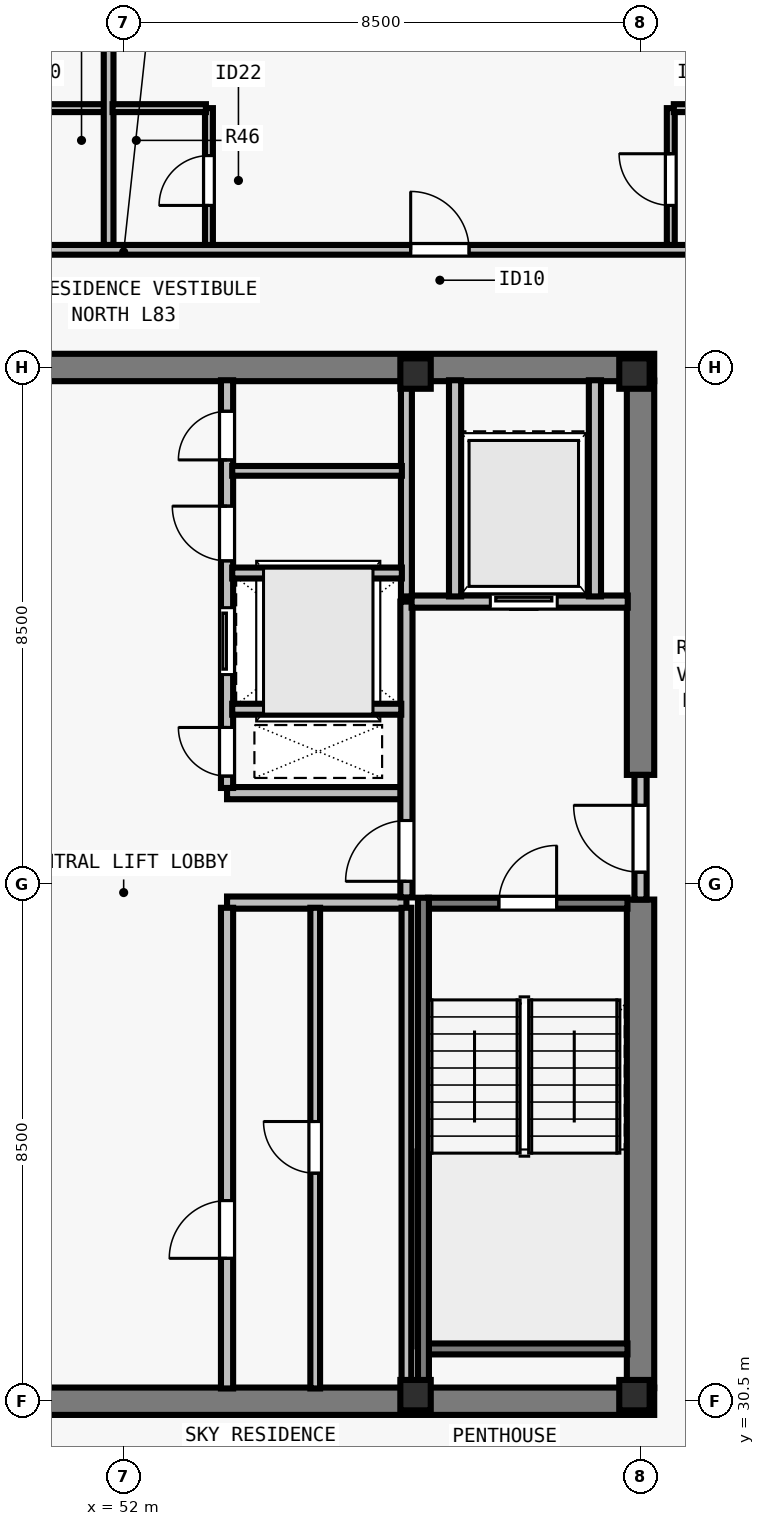
"""IFC4 building model, lengths in metres.
Left out: names, types, materials, properties, quantities, classifications, styles, units other than length and angle.
Written with IfcOpenShell. Run it as: python <this file> out.ifc"""

import sys

from ifc_helpers import new_model, si_unit, direction, frame, frame_2d, origin, origin_2d, place, context, subcontext, project, spatial, rectangle, i_section, extrude, element, fill, save


model = new_model("IFC4")
c1 = context("Model", 3, precision=1e-05, world=origin(), true_north=direction((0.0, 1.0)))
c2 = subcontext(c1, "Body", "Model", "MODEL_VIEW")
j1 = project(units=[si_unit("LENGTHUNIT", "METRE"), si_unit("PLANEANGLEUNIT", "RADIAN")], contexts=[c1])
p1 = place(None, origin())
s1 = spatial("IfcSite", under=j1, at=p1, CompositionType="ELEMENT")
p2 = place(p1, origin())
s2 = spatial("IfcBuilding", under=s1, at=p2, CompositionType="ELEMENT")
p3 = place(p2, frame((0.0, 0.0, 301.5)))
s3 = spatial("IfcBuildingStorey", under=s2, at=p3, CompositionType="ELEMENT", Elevation=301.5)
for number, where, z_axis, x_axis in (
    (1, (56.8, 30.6, 0.0), (0.0, 0.0, 1.0), (1.0, 0.0, 0.0)),
    (2, (60.4, 30.6, 0.0), (0.0, 0.0, 1.0), (1.0, 0.0, 0.0)),
    (3, (56.8, 47.4, 0.0), (0.0, 0.0, 1.0), (1.0, 0.0, 0.0)),
    (4, (60.4, 47.4, 0.0), (0.0, 0.0, 1.0), (1.0, 0.0, 0.0)),
):
    element("IfcColumn", number, at=place(p3, frame(where, z_axis=z_axis, x_axis=x_axis)), inside=s3, PredefinedType="COLUMN", context=c2, shape_type="SweptSolid", body=[
        extrude(i_section(OverallWidth=0.5, OverallDepth=0.5, WebThickness=0.028, FlangeThickness=0.045, at=origin_2d()), origin(), (0.0, 0.0, 1.0), 3.5),
    ])
for number, where, z_axis, x_axis in (
    (5, (43.275, 30.5, 0.0), (0.0, 0.0, 1.0), (1.0, 0.0, 0.0)),
    (6, (43.275, 47.5, 0.0), (0.0, 0.0, 1.0), (1.0, 0.0, 0.0)),
):
    element("IfcWall", number, at=place(p3, frame(where, z_axis=z_axis, x_axis=x_axis)), inside=s3, PredefinedType="SHEAR", context=c2, shape_type="SweptSolid", body=[
        extrude(rectangle(XDim=17.45, YDim=0.45, at=frame_2d((8.725, 0.0))), origin(), (0.0, 0.0, 1.0), 3.29),
    ])
p4 = place(p3, frame((60.5, 30.715, 0.0), z_axis=(0.0, 0.0, 1.0), x_axis=(0.0, 1.0, 0.0)))
e7 = element("IfcWall", 7, at=p4, inside=s3, PredefinedType="SHEAR", context=c2, shape_type="SweptSolid", body=[
    extrude(rectangle(XDim=8.035, YDim=0.45, at=frame_2d((4.018, 0.0))), origin(), (0.0, 0.0, 1.0), 3.29),
])
p5 = place(p3, frame((60.5, 40.8, 0.0), z_axis=(0.0, 0.0, 1.0), x_axis=(0.0, 1.0, 0.0)))
e8 = element("IfcWall", 8, at=p5, inside=s3, PredefinedType="SHEAR", context=c2, shape_type="SweptSolid", body=[
    extrude(rectangle(XDim=6.485, YDim=0.45, at=frame_2d((3.242, 0.0))), origin(), (0.0, 0.0, 1.0), 3.29),
])
for number, where, z_axis, x_axis in (
    (9, (53.7, 38.7, 0.0), (0.0, 0.0, 1.0), (1.0, 0.0, 0.0)),
    (10, (53.7, 40.5, 0.0), (0.0, 0.0, 1.0), (1.0, 0.0, 0.0)),
):
    element("IfcWall", number, at=place(p3, frame(where, z_axis=z_axis, x_axis=x_axis)), inside=s3, PredefinedType="SOLIDWALL", context=c2, shape_type="SweptSolid", body=[
        extrude(rectangle(XDim=2.95, YDim=0.2, at=frame_2d((1.475, 0.0))), origin(), (0.0, 0.0, 1.0), 3.29),
    ])
p6 = place(p3, frame((53.7, 30.71, 0.0), z_axis=(0.0, 0.0, 1.0), x_axis=(0.0, 1.0, 0.0)))
e11 = element("IfcWall", 11, at=p6, inside=s3, PredefinedType="SOLIDWALL", context=c2, shape_type="SweptSolid", body=[
    extrude(rectangle(XDim=7.905, YDim=0.2, at=frame_2d((3.953, 0.0))), origin(), (0.0, 0.0, 1.0), 3.29),
])
p7 = place(p6, frame((2.14, 0.0, 0.0)))
e12 = element("IfcOpeningElement", 12, at=p7, cuts=e11, PredefinedType="OPENING", context=c2, shape_type="SweptSolid", body=[
    extrude(rectangle(XDim=0.95, YDim=2.12, at=frame_2d((0.475, 1.06))), frame((0.0, 0.11, 0.0), z_axis=(0.0, -1.0, 0.0), x_axis=(1.0, 0.0, 0.0)), (0.0, 0.0, 1.0), 0.22),
])
p8 = place(p3, frame((53.7, 40.585, 0.0), z_axis=(0.0, 0.0, 1.0), x_axis=(0.0, 1.0, 0.0)))
e13 = element("IfcWall", 13, at=p8, inside=s3, PredefinedType="SOLIDWALL", context=c2, shape_type="SweptSolid", body=[
    extrude(rectangle(XDim=6.705, YDim=0.2, at=frame_2d((3.353, 0.0))), origin(), (0.0, 0.0, 1.0), 3.29),
])
p9 = place(p8, frame((0.195, 0.0, 0.0)))
e14 = element("IfcOpeningElement", 14, at=p9, cuts=e13, PredefinedType="OPENING", context=c2, shape_type="SweptSolid", body=[
    extrude(rectangle(XDim=0.8, YDim=2.08, at=frame_2d((0.4, 1.04))), frame((0.0, 0.11, 0.0), z_axis=(0.0, -1.0, 0.0), x_axis=(1.0, 0.0, 0.0)), (0.0, 0.0, 1.0), 0.22),
])
p10 = place(p8, frame((1.865, 0.0, 0.0)))
e15 = element("IfcOpeningElement", 15, at=p10, cuts=e13, PredefinedType="OPENING", context=c2, shape_type="SweptSolid", body=[
    extrude(rectangle(XDim=1.1, YDim=2.2, at=frame_2d((0.55, 1.1))), frame((0.0, 0.11, 0.0), z_axis=(0.0, -1.0, 0.0), x_axis=(1.0, 0.0, 0.0)), (0.0, 0.0, 1.0), 0.22),
])
p11 = place(p8, frame((3.735, 0.0, 0.0)))
e16 = element("IfcOpeningElement", 16, at=p11, cuts=e13, PredefinedType="OPENING", context=c2, shape_type="SweptSolid", body=[
    extrude(rectangle(XDim=0.9, YDim=2.12, at=frame_2d((0.45, 1.06))), frame((0.0, 0.11, 0.0), z_axis=(0.0, -1.0, 0.0), x_axis=(1.0, 0.0, 0.0)), (0.0, 0.0, 1.0), 0.22),
])
p12 = place(p8, frame((5.395, 0.0, 0.0)))
e17 = element("IfcOpeningElement", 17, at=p12, cuts=e13, PredefinedType="OPENING", context=c2, shape_type="SweptSolid", body=[
    extrude(rectangle(XDim=0.8, YDim=2.1, at=frame_2d((0.4, 1.05))), frame((0.0, 0.11, 0.0), z_axis=(0.0, -1.0, 0.0), x_axis=(1.0, 0.0, 0.0)), (0.0, 0.0, 1.0), 0.22),
])
p13 = place(p3, frame((60.5, 38.75, 0.0), z_axis=(0.0, 0.0, 1.0), x_axis=(0.0, 1.0, 0.0)))
e18 = element("IfcWall", 18, at=p13, inside=s3, PredefinedType="SOLIDWALL", context=c2, shape_type="SweptSolid", body=[
    extrude(rectangle(XDim=2.05, YDim=0.2, at=frame_2d((1.025, 0.0))), origin(), (0.0, 0.0, 1.0), 3.29),
])
p14 = place(p13, frame((0.45, 0.0, 0.0)))
e19 = element("IfcOpeningElement", 19, at=p14, cuts=e18, PredefinedType="OPENING", context=c2, shape_type="SweptSolid", body=[
    extrude(rectangle(XDim=1.1, YDim=2.15, at=frame_2d((0.55, 1.075))), frame((0.0, 0.11, 0.0), z_axis=(0.0, -1.0, 0.0), x_axis=(1.0, 0.0, 0.0)), (0.0, 0.0, 1.0), 0.22),
])
p15 = place(p3, frame((56.65, 38.785, 0.0), z_axis=(0.0, 0.0, 1.0), x_axis=(0.0, 1.0, 0.0)))
e20 = element("IfcWall", 20, at=p15, inside=s3, PredefinedType="SOLIDWALL", context=c2, shape_type="SweptSolid", body=[
    extrude(rectangle(XDim=4.865, YDim=0.2, at=frame_2d((2.433, 0.0))), origin(), (0.0, 0.0, 1.0), 3.29),
])
p16 = place(p15, frame((0.265, 0.0, 0.0)))
e21 = element("IfcOpeningElement", 21, at=p16, cuts=e20, PredefinedType="OPENING", context=c2, shape_type="SweptSolid", body=[
    extrude(rectangle(XDim=1.0, YDim=2.15, at=frame_2d((0.5, 1.075))), frame((0.0, 0.11, 0.0), z_axis=(0.0, -1.0, 0.0), x_axis=(1.0, 0.0, 0.0)), (0.0, 0.0, 1.0), 0.22),
])
p17 = place(p3, frame((56.735, 43.65, 0.0), z_axis=(0.0, 0.0, 1.0), x_axis=(1.0, 0.0, 0.0)))
e22 = element("IfcWall", 22, at=p17, inside=s3, PredefinedType="SOLIDWALL", context=c2, shape_type="SweptSolid", body=[
    extrude(rectangle(XDim=3.555, YDim=0.2, at=frame_2d((1.777, 0.0))), origin(), (0.0, 0.0, 1.0), 3.29),
])
p18 = place(p17, frame((1.295, 0.0, 0.0)))
e23 = element("IfcOpeningElement", 23, at=p18, cuts=e22, PredefinedType="OPENING", context=c2, shape_type="SweptSolid", body=[
    extrude(rectangle(XDim=1.1, YDim=2.2, at=frame_2d((0.55, 1.1))), frame((0.0, 0.11, 0.0), z_axis=(0.0, -1.0, 0.0), x_axis=(1.0, 0.0, 0.0)), (0.0, 0.0, 1.0), 0.22),
])
for number, where, z_axis, x_axis in (
    (24, (57.45, 43.735, 0.0), (0.0, 0.0, 1.0), (0.0, 1.0, 0.0)),
    (25, (59.75, 43.735, 0.0), (0.0, 0.0, 1.0), (0.0, 1.0, 0.0)),
):
    element("IfcWall", number, at=place(p3, frame(where, z_axis=z_axis, x_axis=x_axis)), inside=s3, PredefinedType="SOLIDWALL", context=c2, shape_type="SweptSolid", body=[
        extrude(rectangle(XDim=3.555, YDim=0.2, at=frame_2d((1.777, 0.0))), origin(), (0.0, 0.0, 1.0), 3.29),
    ])
p19 = place(p3, frame((56.65, 30.71, 0.0), z_axis=(0.0, 0.0, 1.0), x_axis=(0.0, 1.0, 0.0)))
e26 = element("IfcWall", 26, at=p19, inside=s3, PredefinedType="PARTITIONING", context=c2, shape_type="SweptSolid", body=[
    extrude(rectangle(XDim=7.905, YDim=0.16, at=frame_2d((3.953, 0.0))), origin(), (0.0, 0.0, 1.0), 3.29),
])
p20 = place(p3, frame((55.15, 30.71, 0.0), z_axis=(0.0, 0.0, 1.0), x_axis=(0.0, 1.0, 0.0)))
e27 = element("IfcWall", 27, at=p20, inside=s3, PredefinedType="PARTITIONING", context=c2, shape_type="SweptSolid", body=[
    extrude(rectangle(XDim=7.905, YDim=0.16, at=frame_2d((3.953, 0.0))), origin(), (0.0, 0.0, 1.0), 3.29),
])
p21 = place(p20, frame((3.54, 0.0, 0.0)))
e28 = element("IfcOpeningElement", 28, at=p21, cuts=e27, PredefinedType="OPENING", context=c2, shape_type="SweptSolid", body=[
    extrude(rectangle(XDim=0.85, YDim=2.12, at=frame_2d((0.425, 1.06))), frame((0.0, 0.09, 0.0), z_axis=(0.0, -1.0, 0.0), x_axis=(1.0, 0.0, 0.0)), (0.0, 0.0, 1.0), 0.18),
])
p22 = place(p3, frame((56.65, 43.735, 0.0), z_axis=(0.0, 0.0, 1.0), x_axis=(0.0, 1.0, 0.0)))
e29 = element("IfcWall", 29, at=p22, inside=s3, PredefinedType="SOLIDWALL", context=c2, shape_type="SweptSolid", body=[
    extrude(rectangle(XDim=3.555, YDim=0.18, at=frame_2d((1.777, 0.0))), origin(), (0.0, 0.0, 1.0), 3.29),
])
p23 = place(p3, frame((53.785, 41.88, 0.0), z_axis=(0.0, 0.0, 1.0), x_axis=(1.0, 0.0, 0.0)))
e30 = element("IfcWall", 30, at=p23, inside=s3, PredefinedType="SOLIDWALL", context=c2, shape_type="SweptSolid", body=[
    extrude(rectangle(XDim=2.78, YDim=0.18, at=frame_2d((1.39, 0.0))), origin(), (0.0, 0.0, 1.0), 3.29),
])
p24 = place(p3, frame((53.785, 44.12, 0.0), z_axis=(0.0, 0.0, 1.0), x_axis=(1.0, 0.0, 0.0)))
e31 = element("IfcWall", 31, at=p24, inside=s3, PredefinedType="SOLIDWALL", context=c2, shape_type="SweptSolid", body=[
    extrude(rectangle(XDim=2.79, YDim=0.18, at=frame_2d((1.395, 0.0))), origin(), (0.0, 0.0, 1.0), 3.29),
])
p25 = place(p3, frame((53.785, 45.8, 0.0), z_axis=(0.0, 0.0, 1.0), x_axis=(1.0, 0.0, 0.0)))
e32 = element("IfcWall", 32, at=p25, inside=s3, PredefinedType="PARTITIONING", context=c2, shape_type="SweptSolid", body=[
    extrude(rectangle(XDim=2.79, YDim=0.16, at=frame_2d((1.395, 0.0))), origin(), (0.0, 0.0, 1.0), 3.29),
])
p26 = place(p3, frame((31.285, 49.435, 0.0), z_axis=(0.0, 0.0, 1.0), x_axis=(1.0, 0.0, 0.0)))
e33 = element("IfcWall", 33, at=p26, inside=s3, PredefinedType="PARTITIONING", context=c2, shape_type="SweptSolid", body=[
    extrude(rectangle(XDim=41.43, YDim=0.16, at=frame_2d((20.715, 0.0))), origin(), (0.0, 0.0, 1.0), 3.009),
])
p27 = place(p26, frame((4.979, 0.0, 0.0)))
e34 = element("IfcOpeningElement", 34, at=p27, cuts=e33, PredefinedType="OPENING", context=c2, shape_type="SweptSolid", body=[
    extrude(rectangle(XDim=0.96, YDim=2.18, at=frame_2d((0.48, 1.09))), frame((0.0, 0.09, 0.0), z_axis=(0.0, -1.0, 0.0), x_axis=(1.0, 0.0, 0.0)), (0.0, 0.0, 1.0), 0.18),
])
p28 = place(p26, frame((15.145, 0.0, 0.0)))
e35 = element("IfcOpeningElement", 35, at=p28, cuts=e33, PredefinedType="OPENING", context=c2, shape_type="SweptSolid", body=[
    extrude(rectangle(XDim=0.96, YDim=2.18, at=frame_2d((0.48, 1.09))), frame((0.0, 0.09, 0.0), z_axis=(0.0, -1.0, 0.0), x_axis=(1.0, 0.0, 0.0)), (0.0, 0.0, 1.0), 0.18),
])
p29 = place(p26, frame((25.435, 0.0, 0.0)))
e36 = element("IfcOpeningElement", 36, at=p29, cuts=e33, PredefinedType="OPENING", context=c2, shape_type="SweptSolid", body=[
    extrude(rectangle(XDim=0.96, YDim=2.18, at=frame_2d((0.48, 1.09))), frame((0.0, 0.09, 0.0), z_axis=(0.0, -1.0, 0.0), x_axis=(1.0, 0.0, 0.0)), (0.0, 0.0, 1.0), 0.18),
])
p30 = place(p26, frame((35.849, 0.0, 0.0)))
e37 = element("IfcOpeningElement", 37, at=p30, cuts=e33, PredefinedType="OPENING", context=c2, shape_type="SweptSolid", body=[
    extrude(rectangle(XDim=0.96, YDim=2.18, at=frame_2d((0.48, 1.09))), frame((0.0, 0.09, 0.0), z_axis=(0.0, -1.0, 0.0), x_axis=(1.0, 0.0, 0.0)), (0.0, 0.0, 1.0), 0.18),
])
p31 = place(p3, frame((50.153, 51.765, 0.0), z_axis=(0.0, 0.0, 1.0), x_axis=(1.0, 0.0, 0.0)))
e38 = element("IfcWall", 38, at=p31, inside=s3, PredefinedType="PLUMBINGWALL", context=c2, shape_type="SweptSolid", body=[
    extrude(rectangle(XDim=1.6, YDim=0.13, at=frame_2d((0.8, 0.0))), origin(), (0.0, 0.0, 1.0), 3.29),
])
p32 = place(p3, frame((51.752, 49.515, 0.0), z_axis=(0.0, 0.0, 1.0), x_axis=(0.0, 1.0, 0.0)))
e39 = element("IfcWall", 39, at=p32, inside=s3, PredefinedType="PARTITIONING", context=c2, shape_type="SweptSolid", body=[
    extrude(rectangle(XDim=10.185, YDim=0.16, at=frame_2d((5.093, 0.0))), origin(), (0.0, 0.0, 1.0), 3.009),
])
p33 = place(p3, frame((53.403, 49.515, 0.0), z_axis=(0.0, 0.0, 1.0), x_axis=(0.0, 1.0, 0.0)))
e40 = element("IfcWall", 40, at=p33, inside=s3, PredefinedType="PLUMBINGWALL", context=c2, shape_type="SweptSolid", body=[
    extrude(rectangle(XDim=2.25, YDim=0.13, at=frame_2d((1.125, 0.0))), origin(), (0.0, 0.0, 1.0), 3.29),
])
p34 = place(p33, frame((0.65, 0.0, 0.0)))
e41 = element("IfcOpeningElement", 41, at=p34, cuts=e40, PredefinedType="OPENING", context=c2, shape_type="SweptSolid", body=[
    extrude(rectangle(XDim=0.82, YDim=2.1, at=frame_2d((0.41, 1.05))), frame((0.0, 0.075, 0.0), z_axis=(0.0, -1.0, 0.0), x_axis=(1.0, 0.0, 0.0)), (0.0, 0.0, 1.0), 0.15),
])
p35 = place(p3, frame((51.817, 51.765, 0.0), z_axis=(0.0, 0.0, 1.0), x_axis=(1.0, 0.0, 0.0)))
e42 = element("IfcWall", 42, at=p35, inside=s3, PredefinedType="PLUMBINGWALL", context=c2, shape_type="SweptSolid", body=[
    extrude(rectangle(XDim=1.535, YDim=0.13, at=frame_2d((0.768, 0.0))), origin(), (0.0, 0.0, 1.0), 3.29),
])
p36 = place(p3, frame((60.998, 49.515, 0.0), z_axis=(0.0, 0.0, 1.0), x_axis=(0.0, 1.0, 0.0)))
e43 = element("IfcWall", 43, at=p36, inside=s3, PredefinedType="PLUMBINGWALL", context=c2, shape_type="SweptSolid", body=[
    extrude(rectangle(XDim=2.25, YDim=0.13, at=frame_2d((1.125, 0.0))), origin(), (0.0, 0.0, 1.0), 3.29),
])
p37 = place(p36, frame((0.65, 0.0, 0.0)))
e44 = element("IfcOpeningElement", 44, at=p37, cuts=e43, PredefinedType="OPENING", context=c2, shape_type="SweptSolid", body=[
    extrude(rectangle(XDim=0.85, YDim=2.1, at=frame_2d((0.425, 1.05))), frame((0.0, 0.075, 0.0), z_axis=(0.0, -1.0, 0.0), x_axis=(1.0, 0.0, 0.0)), (0.0, 0.0, 1.0), 0.15),
])
p38 = place(p3, frame((61.048, 51.765, 0.0), z_axis=(0.0, 0.0, 1.0), x_axis=(1.0, 0.0, 0.0)))
e45 = element("IfcWall", 45, at=p38, inside=s3, PredefinedType="PLUMBINGWALL", context=c2, shape_type="SweptSolid", body=[
    extrude(rectangle(XDim=1.6, YDim=0.13, at=frame_2d((0.8, 0.0))), origin(), (0.0, 0.0, 1.0), 3.29),
])
p39 = place(p3, frame((57.005, 38.69, 0.0), z_axis=(0.0, 0.0, 1.0), x_axis=(1.0, 0.0, 0.0)))
e46 = element("IfcWall", 46, at=p39, inside=s3, PredefinedType="SOLIDWALL", context=c2, shape_type="SweptSolid", body=[
    extrude(rectangle(XDim=3.28, YDim=0.18, at=frame_2d((1.64, 0.0))), origin(), (0.0, 0.0, 1.0), 3.29),
])
p40 = place(p39, frame((1.165, 0.0, 0.0)))
e47 = element("IfcOpeningElement", 47, at=p40, cuts=e46, PredefinedType="OPENING", context=c2, shape_type="SweptSolid", body=[
    extrude(rectangle(XDim=0.95, YDim=2.15, at=frame_2d((0.475, 1.075))), frame((0.0, 0.1, 0.0), z_axis=(0.0, -1.0, 0.0), x_axis=(1.0, 0.0, 0.0)), (0.0, 0.0, 1.0), 0.2),
])
p41 = place(p3, frame((57.005, 31.36, 0.0), z_axis=(0.0, 0.0, 1.0), x_axis=(1.0, 0.0, 0.0)))
e48 = element("IfcWall", 48, at=p41, inside=s3, PredefinedType="SOLIDWALL", context=c2, shape_type="SweptSolid", body=[
    extrude(rectangle(XDim=3.28, YDim=0.18, at=frame_2d((1.64, 0.0))), origin(), (0.0, 0.0, 1.0), 3.29),
])
p42 = place(p3, frame((56.93, 38.78, 0.0), z_axis=(0.0, 0.0, 1.0), x_axis=(0.0, -1.0, 0.0)))
e49 = element("IfcWall", 49, at=p42, inside=s3, PredefinedType="SOLIDWALL", context=c2, shape_type="SweptSolid", body=[
    extrude(rectangle(XDim=8.067, YDim=0.18, at=frame_2d((4.034, 0.0))), origin(), (0.0, 0.0, 1.0), 3.29),
])
p43 = place(p14, origin())
e50 = element("IfcDoor", 50, at=p43, inside=s3, OperationType="SINGLE_SWING_RIGHT", PredefinedType="DOOR", context=c2, shape_type="SweptSolid", body=[
    extrude(rectangle(XDim=1.1, YDim=2.15, at=frame_2d((0.55, 1.075))), frame((0.0, 0.025, 0.0), z_axis=(0.0, -1.0, 0.0), x_axis=(1.0, 0.0, 0.0)), (0.0, 0.0, 1.0), 0.05),
])
fill(e19, e50)
p44 = place(p16, origin())
e51 = element("IfcDoor", 51, at=p44, inside=s3, OperationType="SINGLE_SWING_LEFT", PredefinedType="DOOR", context=c2, shape_type="SweptSolid", body=[
    extrude(rectangle(XDim=1.0, YDim=2.15, at=frame_2d((0.5, 1.075))), frame((0.0, 0.025, 0.0), z_axis=(0.0, -1.0, 0.0), x_axis=(1.0, 0.0, 0.0)), (0.0, 0.0, 1.0), 0.05),
])
fill(e21, e51)
p45 = place(p18, origin())
e52 = element("IfcDoor", 52, at=p45, inside=s3, OperationType="SLIDING_TO_LEFT", PredefinedType="DOOR", context=c2, shape_type="SweptSolid", body=[
    extrude(rectangle(XDim=1.1, YDim=2.2, at=frame_2d((0.55, 1.1))), frame((0.0, 0.025, 0.0), z_axis=(0.0, -1.0, 0.0), x_axis=(1.0, 0.0, 0.0)), (0.0, 0.0, 1.0), 0.05),
])
fill(e23, e52)
p46 = place(p7, origin())
e53 = element("IfcDoor", 53, at=p46, inside=s3, OperationType="SINGLE_SWING_LEFT", PredefinedType="DOOR", context=c2, shape_type="SweptSolid", body=[
    extrude(rectangle(XDim=0.95, YDim=2.12, at=frame_2d((0.475, 1.06))), frame((0.0, 0.025, 0.0), z_axis=(0.0, -1.0, 0.0), x_axis=(1.0, 0.0, 0.0)), (0.0, 0.0, 1.0), 0.05),
])
fill(e12, e53)
p47 = place(p21, origin())
e54 = element("IfcDoor", 54, at=p47, inside=s3, OperationType="SINGLE_SWING_RIGHT", PredefinedType="DOOR", context=c2, shape_type="SweptSolid", body=[
    extrude(rectangle(XDim=0.85, YDim=2.12, at=frame_2d((0.425, 1.06))), frame((0.0, 0.025, 0.0), z_axis=(0.0, -1.0, 0.0), x_axis=(1.0, 0.0, 0.0)), (0.0, 0.0, 1.0), 0.05),
])
fill(e28, e54)
p48 = place(p9, origin())
e55 = element("IfcDoor", 55, at=p48, inside=s3, OperationType="SINGLE_SWING_RIGHT", PredefinedType="DOOR", context=c2, shape_type="SweptSolid", body=[
    extrude(rectangle(XDim=0.8, YDim=2.08, at=frame_2d((0.4, 1.04))), frame((0.0, 0.025, 0.0), z_axis=(0.0, -1.0, 0.0), x_axis=(1.0, 0.0, 0.0)), (0.0, 0.0, 1.0), 0.05),
])
fill(e14, e55)
p49 = place(p10, origin())
e56 = element("IfcDoor", 56, at=p49, inside=s3, OperationType="SLIDING_TO_LEFT", PredefinedType="DOOR", context=c2, shape_type="SweptSolid", body=[
    extrude(rectangle(XDim=1.1, YDim=2.2, at=frame_2d((0.55, 1.1))), frame((0.0, 0.025, 0.0), z_axis=(0.0, -1.0, 0.0), x_axis=(1.0, 0.0, 0.0)), (0.0, 0.0, 1.0), 0.05),
])
fill(e15, e56)
p50 = place(p11, origin())
e57 = element("IfcDoor", 57, at=p50, inside=s3, OperationType="SINGLE_SWING_RIGHT", PredefinedType="DOOR", context=c2, shape_type="SweptSolid", body=[
    extrude(rectangle(XDim=0.9, YDim=2.12, at=frame_2d((0.45, 1.06))), frame((0.0, 0.025, 0.0), z_axis=(0.0, -1.0, 0.0), x_axis=(1.0, 0.0, 0.0)), (0.0, 0.0, 1.0), 0.05),
])
fill(e16, e57)
p51 = place(p12, origin())
e58 = element("IfcDoor", 58, at=p51, inside=s3, OperationType="SINGLE_SWING_LEFT", PredefinedType="DOOR", context=c2, shape_type="SweptSolid", body=[
    extrude(rectangle(XDim=0.8, YDim=2.1, at=frame_2d((0.4, 1.05))), frame((0.0, 0.025, 0.0), z_axis=(0.0, -1.0, 0.0), x_axis=(1.0, 0.0, 0.0)), (0.0, 0.0, 1.0), 0.05),
])
fill(e17, e58)
p52 = place(p34, origin())
e59 = element("IfcDoor", 59, at=p52, inside=s3, OperationType="SINGLE_SWING_LEFT", PredefinedType="DOOR", context=c2, shape_type="SweptSolid", body=[
    extrude(rectangle(XDim=0.82, YDim=2.1, at=frame_2d((0.41, 1.05))), frame((0.0, 0.025, 0.0), z_axis=(0.0, -1.0, 0.0), x_axis=(1.0, 0.0, 0.0)), (0.0, 0.0, 1.0), 0.05),
])
fill(e41, e59)
p53 = place(p37, origin())
e60 = element("IfcDoor", 60, at=p53, inside=s3, OperationType="SINGLE_SWING_RIGHT", PredefinedType="DOOR", context=c2, shape_type="SweptSolid", body=[
    extrude(rectangle(XDim=0.85, YDim=2.1, at=frame_2d((0.425, 1.05))), frame((0.0, 0.025, 0.0), z_axis=(0.0, -1.0, 0.0), x_axis=(1.0, 0.0, 0.0)), (0.0, 0.0, 1.0), 0.05),
])
fill(e44, e60)
p54 = place(p29, origin())
e61 = element("IfcDoor", 61, at=p54, inside=s3, OperationType="SINGLE_SWING_LEFT", PredefinedType="DOOR", context=c2, shape_type="SweptSolid", body=[
    extrude(rectangle(XDim=0.96, YDim=2.18, at=frame_2d((0.48, 1.09))), frame((0.0, 0.025, 0.0), z_axis=(0.0, -1.0, 0.0), x_axis=(1.0, 0.0, 0.0)), (0.0, 0.0, 1.0), 0.05),
])
fill(e36, e61)
p55 = place(p40, origin())
e62 = element("IfcDoor", 62, at=p55, inside=s3, OperationType="SINGLE_SWING_RIGHT", PredefinedType="DOOR", context=c2, shape_type="SweptSolid", body=[
    extrude(rectangle(XDim=0.95, YDim=2.15, at=frame_2d((0.475, 1.075))), frame((0.0, 0.025, 0.0), z_axis=(0.0, -1.0, 0.0), x_axis=(1.0, 0.0, 0.0)), (0.0, 0.0, 1.0), 0.05),
])
fill(e47, e62)
save(model, sys.argv[1])
